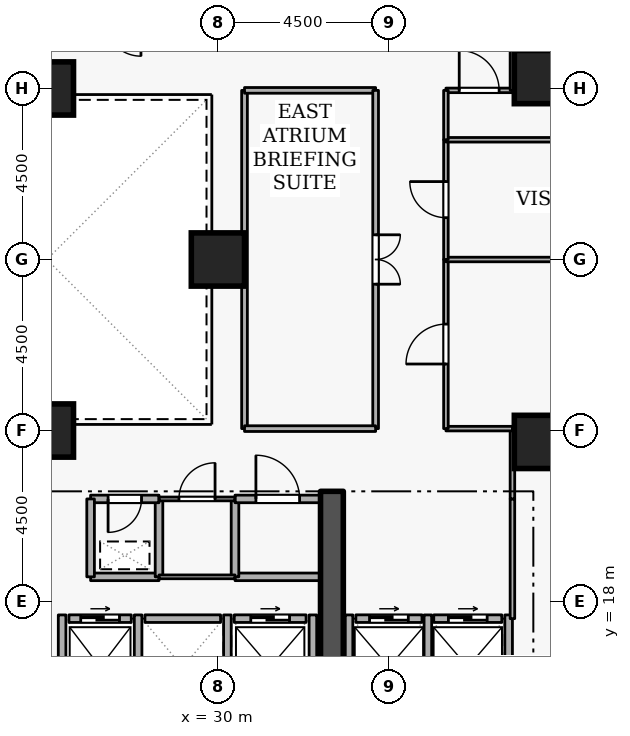
"""IFC4 building model, lengths in metres.
Left out: names, types, materials, properties, quantities, classifications, styles, units other than length and angle.
Written with IfcOpenShell. Run it as: python <this file> out.ifc"""

import sys

from ifc_helpers import new_model, si_unit, direction, frame, frame_2d, origin, origin_2d, place, context, subcontext, project, spatial, rectangle, extrude, element, fill, save


model = new_model("IFC4")
c1 = context("Model", 3, precision=1e-05, world=origin(), true_north=direction((0.0, 1.0)))
c2 = subcontext(c1, "Body", "Model", "MODEL_VIEW")
j1 = project(units=[si_unit("LENGTHUNIT", "METRE"), si_unit("PLANEANGLEUNIT", "RADIAN")], contexts=[c1])
p1 = place(None, origin())
s1 = spatial("IfcSite", under=j1, at=p1, CompositionType="ELEMENT")
p2 = place(p1, origin())
s2 = spatial("IfcBuilding", under=s1, at=p2, CompositionType="ELEMENT")
p3 = place(p2, frame((0.0, 0.0, 60.9)))
s3 = spatial("IfcBuildingStorey", under=s2, at=p3, CompositionType="ELEMENT", Elevation=60.9)
p4 = place(p3, frame((33.0, 15.2, 0.0), z_axis=(0.0, 0.0, 1.0), x_axis=(0.0, 1.0, 0.0)))
e1 = element("IfcWall", 1, at=p4, inside=s3, PredefinedType="SHEAR", context=c2, shape_type="SweptSolid", body=[
    extrude(rectangle(XDim=5.7, YDim=0.6, at=frame_2d((2.85, 0.0))), origin(), (0.0, 0.0, 1.0), 3.6),
])
for number, where, z_axis, x_axis in (
    (2, (38.5, 22.2, 0.0), (0.0, 0.0, 1.0), (1.0, 0.0, 0.0)),
    (3, (38.5, 31.8, 0.0), (0.0, 0.0, 1.0), (1.0, 0.0, 0.0)),
    (4, (25.5, 22.5, 0.0), (0.0, 0.0, 1.0), (1.0, 0.0, 0.0)),
    (5, (25.5, 31.5, 0.0), (0.0, 0.0, 1.0), (1.0, 0.0, 0.0)),
    (6, (30.0, 27.0, 0.0), (0.0, 0.0, 1.0), (1.0, 0.0, 0.0)),
):
    element("IfcColumn", number, at=place(p3, frame(where, z_axis=z_axis, x_axis=x_axis)), inside=s3, PredefinedType="COLUMN", context=c2, shape_type="SweptSolid", body=[
        extrude(rectangle(XDim=1.4, YDim=1.4, at=origin_2d()), origin(), (0.0, 0.0, 1.0), 3.6),
    ])
p5 = place(p3, frame((26.08, 17.55, 0.0), z_axis=(0.0, 0.0, 1.0), x_axis=(1.0, 0.0, 0.0)))
e7 = element("IfcWall", 7, at=p5, inside=s3, PredefinedType="STANDARD", context=c2, shape_type="SweptSolid", body=[
    extrude(rectangle(XDim=1.64, YDim=0.2, at=frame_2d((0.82, 0.0))), origin(), (0.0, 0.0, 1.0), 3.34),
])
p6 = place(p5, frame((0.31, 0.0, 0.0)))
e8 = element("IfcOpeningElement", 8, at=p6, cuts=e7, PredefinedType="OPENING", context=c2, shape_type="SweptSolid", body=[
    extrude(rectangle(XDim=1.02, YDim=2.06, at=frame_2d((0.51, 1.03))), frame((0.0, 0.11, 0.0), z_axis=(0.0, -1.0, 0.0), x_axis=(1.0, 0.0, 0.0)), (0.0, 0.0, 1.0), 0.22),
])
p7 = place(p3, frame((28.08, 17.55, 0.0), z_axis=(0.0, 0.0, 1.0), x_axis=(1.0, 0.0, 0.0)))
e9 = element("IfcWall", 9, at=p7, inside=s3, PredefinedType="STANDARD", context=c2, shape_type="SweptSolid", body=[
    extrude(rectangle(XDim=1.99, YDim=0.2, at=frame_2d((0.995, 0.0))), origin(), (0.0, 0.0, 1.0), 3.34),
])
p8 = place(p3, frame((30.43, 17.55, 0.0), z_axis=(0.0, 0.0, 1.0), x_axis=(1.0, 0.0, 0.0)))
e10 = element("IfcWall", 10, at=p8, inside=s3, PredefinedType="STANDARD", context=c2, shape_type="SweptSolid", body=[
    extrude(rectangle(XDim=1.89, YDim=0.2, at=frame_2d((0.945, 0.0))), origin(), (0.0, 0.0, 1.0), 3.34),
])
p9 = place(p8, frame((0.435, 0.0, 0.0)))
e11 = element("IfcOpeningElement", 11, at=p9, cuts=e10, PredefinedType="OPENING", context=c2, shape_type="SweptSolid", body=[
    extrude(rectangle(XDim=1.02, YDim=2.06, at=frame_2d((0.51, 1.03))), frame((0.0, 0.11, 0.0), z_axis=(0.0, -1.0, 0.0), x_axis=(1.0, 0.0, 0.0)), (0.0, 0.0, 1.0), 0.22),
])
p10 = place(p3, frame((33.63, 17.55, 0.0), z_axis=(0.0, 0.0, 1.0), x_axis=(1.0, 0.0, 0.0)))
e12 = element("IfcWall", 12, at=p10, inside=s3, PredefinedType="STANDARD", context=c2, shape_type="SweptSolid", body=[
    extrude(rectangle(XDim=1.74, YDim=0.2, at=frame_2d((0.87, 0.0))), origin(), (0.0, 0.0, 1.0), 3.34),
])
p11 = place(p10, frame((0.36, 0.0, 0.0)))
e13 = element("IfcOpeningElement", 13, at=p11, cuts=e12, PredefinedType="OPENING", context=c2, shape_type="SweptSolid", body=[
    extrude(rectangle(XDim=1.02, YDim=2.06, at=frame_2d((0.51, 1.03))), frame((0.0, 0.11, 0.0), z_axis=(0.0, -1.0, 0.0), x_axis=(1.0, 0.0, 0.0)), (0.0, 0.0, 1.0), 0.22),
])
p12 = place(p3, frame((35.68, 17.55, 0.0), z_axis=(0.0, 0.0, 1.0), x_axis=(1.0, 0.0, 0.0)))
e14 = element("IfcWall", 14, at=p12, inside=s3, PredefinedType="STANDARD", context=c2, shape_type="SweptSolid", body=[
    extrude(rectangle(XDim=1.79, YDim=0.2, at=frame_2d((0.895, 0.0))), origin(), (0.0, 0.0, 1.0), 3.34),
])
p13 = place(p12, frame((0.385, 0.0, 0.0)))
e15 = element("IfcOpeningElement", 15, at=p13, cuts=e14, PredefinedType="OPENING", context=c2, shape_type="SweptSolid", body=[
    extrude(rectangle(XDim=1.02, YDim=2.06, at=frame_2d((0.51, 1.03))), frame((0.0, 0.11, 0.0), z_axis=(0.0, -1.0, 0.0), x_axis=(1.0, 0.0, 0.0)), (0.0, 0.0, 1.0), 0.22),
])
for number, where, z_axis, x_axis in (
    (16, (27.9, 15.212, 0.0), (0.0, 0.0, 1.0), (0.0, 1.0, 0.0)),
    (17, (25.9, 15.212, 0.0), (0.0, 0.0, 1.0), (0.0, 1.0, 0.0)),
    (18, (30.25, 15.212, 0.0), (0.0, 0.0, 1.0), (0.0, 1.0, 0.0)),
    (19, (32.5, 15.212, 0.0), (0.0, 0.0, 1.0), (0.0, 1.0, 0.0)),
):
    element("IfcWall", number, at=place(p3, frame(where, z_axis=z_axis, x_axis=x_axis)), inside=s3, PredefinedType="STANDARD", context=c2, shape_type="SweptSolid", body=[
        extrude(rectangle(XDim=2.436, YDim=0.2, at=frame_2d((1.218, 0.0))), origin(), (0.0, 0.0, 1.0), 3.34),
    ])
for number, where, z_axis, x_axis in (
    (20, (35.525, 15.012, 0.0), (0.0, 0.0, 1.0), (0.0, 1.0, 0.0)),
    (21, (33.45, 15.012, 0.0), (0.0, 0.0, 1.0), (0.0, 1.0, 0.0)),
    (22, (37.65, 15.012, 0.0), (0.0, 0.0, 1.0), (0.0, 1.0, 0.0)),
):
    element("IfcWall", number, at=place(p3, frame(where, z_axis=z_axis, x_axis=x_axis)), inside=s3, PredefinedType="STANDARD", context=c2, shape_type="SweptSolid", body=[
        extrude(rectangle(XDim=2.636, YDim=0.2, at=frame_2d((1.318, 0.0))), origin(), (0.0, 0.0, 1.0), 3.34),
    ])
p14 = place(p3, frame((26.65, 18.65, 0.0), z_axis=(0.0, 0.0, 1.0), x_axis=(1.0, 0.0, 0.0)))
e23 = element("IfcWall", 23, at=p14, inside=s3, PredefinedType="STANDARD", context=c2, shape_type="SweptSolid", body=[
    extrude(rectangle(XDim=1.8, YDim=0.2, at=frame_2d((0.9, 0.0))), origin(), (0.0, 0.0, 1.0), 3.34),
])
p15 = place(p3, frame((28.45, 18.65, 0.0), z_axis=(0.0, 0.0, 1.0), x_axis=(0.0, 1.0, 0.0)))
e24 = element("IfcWall", 24, at=p15, inside=s3, PredefinedType="STANDARD", context=c2, shape_type="SweptSolid", body=[
    extrude(rectangle(XDim=2.05, YDim=0.2, at=frame_2d((1.025, 0.0))), origin(), (0.0, 0.0, 1.0), 3.34),
])
p16 = place(p3, frame((28.45, 20.7, 0.0), z_axis=(0.0, 0.0, 1.0), x_axis=(-1.0, 0.0, 0.0)))
e25 = element("IfcWall", 25, at=p16, inside=s3, PredefinedType="STANDARD", context=c2, shape_type="SweptSolid", body=[
    extrude(rectangle(XDim=1.8, YDim=0.2, at=frame_2d((0.9, 0.0))), origin(), (0.0, 0.0, 1.0), 3.34),
])
p17 = place(p16, frame((0.46, 0.0, 0.0)))
e26 = element("IfcOpeningElement", 26, at=p17, cuts=e25, PredefinedType="OPENING", context=c2, shape_type="SweptSolid", body=[
    extrude(rectangle(XDim=0.88, YDim=2.04, at=frame_2d((0.44, 1.02))), frame((0.0, 0.11, 0.0), z_axis=(0.0, -1.0, 0.0), x_axis=(1.0, 0.0, 0.0)), (0.0, 0.0, 1.0), 0.22),
])
p18 = place(p3, frame((26.65, 20.7, 0.0), z_axis=(0.0, 0.0, 1.0), x_axis=(0.0, -1.0, 0.0)))
e27 = element("IfcWall", 27, at=p18, inside=s3, PredefinedType="STANDARD", context=c2, shape_type="SweptSolid", body=[
    extrude(rectangle(XDim=2.05, YDim=0.2, at=frame_2d((1.025, 0.0))), origin(), (0.0, 0.0, 1.0), 3.34),
])
p19 = place(p3, frame((32.7, 18.65, 0.0), z_axis=(0.0, 0.0, 1.0), x_axis=(-1.0, 0.0, 0.0)))
e28 = element("IfcWall", 28, at=p19, inside=s3, PredefinedType="STANDARD", context=c2, shape_type="SweptSolid", body=[
    extrude(rectangle(XDim=2.25, YDim=0.2, at=frame_2d((1.125, 0.0))), origin(), (0.0, 0.0, 1.0), 3.34),
])
p20 = place(p3, frame((30.45, 18.65, 0.0), z_axis=(0.0, 0.0, 1.0), x_axis=(0.0, 1.0, 0.0)))
e29 = element("IfcWall", 29, at=p20, inside=s3, PredefinedType="STANDARD", context=c2, shape_type="SweptSolid", body=[
    extrude(rectangle(XDim=2.05, YDim=0.2, at=frame_2d((1.025, 0.0))), origin(), (0.0, 0.0, 1.0), 3.34),
])
p21 = place(p3, frame((30.45, 20.7, 0.0), z_axis=(0.0, 0.0, 1.0), x_axis=(1.0, 0.0, 0.0)))
e30 = element("IfcWall", 30, at=p21, inside=s3, PredefinedType="STANDARD", context=c2, shape_type="SweptSolid", body=[
    extrude(rectangle(XDim=2.25, YDim=0.2, at=frame_2d((1.125, 0.0))), origin(), (0.0, 0.0, 1.0), 3.34),
])
p22 = place(p21, frame((0.55, 0.0, 0.0)))
e31 = element("IfcOpeningElement", 31, at=p22, cuts=e30, PredefinedType="OPENING", context=c2, shape_type="SweptSolid", body=[
    extrude(rectangle(XDim=1.15, YDim=2.1, at=frame_2d((0.575, 1.05))), frame((0.0, 0.11, 0.0), z_axis=(0.0, -1.0, 0.0), x_axis=(1.0, 0.0, 0.0)), (0.0, 0.0, 1.0), 0.22),
])
p23 = place(p3, frame((30.45, 18.65, 0.0), z_axis=(0.0, 0.0, 1.0), x_axis=(-1.0, 0.0, 0.0)))
e32 = element("IfcWall", 32, at=p23, inside=s3, PredefinedType="PARTITIONING", context=c2, shape_type="SweptSolid", body=[
    extrude(rectangle(XDim=2.0, YDim=0.1, at=frame_2d((1.0, 0.0))), origin(), (0.0, 0.0, 1.0), 3.34),
])
p24 = place(p3, frame((28.45, 20.7, 0.0), z_axis=(0.0, 0.0, 1.0), x_axis=(1.0, 0.0, 0.0)))
e33 = element("IfcWall", 33, at=p24, inside=s3, PredefinedType="PARTITIONING", context=c2, shape_type="SweptSolid", body=[
    extrude(rectangle(XDim=2.0, YDim=0.1, at=frame_2d((1.0, 0.0))), origin(), (0.0, 0.0, 1.0), 3.34),
])
p25 = place(p24, frame((0.525, 0.0, 0.0)))
e34 = element("IfcOpeningElement", 34, at=p25, cuts=e33, PredefinedType="OPENING", context=c2, shape_type="SweptSolid", body=[
    extrude(rectangle(XDim=0.95, YDim=2.1, at=frame_2d((0.475, 1.05))), frame((0.0, 0.06, 0.0), z_axis=(0.0, -1.0, 0.0), x_axis=(1.0, 0.0, 0.0)), (0.0, 0.0, 1.0), 0.12),
])
p26 = place(p3, frame((37.75, 17.55, 0.0), z_axis=(0.0, 0.0, 1.0), x_axis=(0.0, 1.0, 0.0)))
e35 = element("IfcWall", 35, at=p26, inside=s3, PredefinedType="PARTITIONING", context=c2, shape_type="SweptSolid", body=[
    extrude(rectangle(XDim=3.15, YDim=0.12, at=frame_2d((1.575, 0.0))), origin(), (0.0, 0.0, 1.0), 3.34),
])
p27 = place(p3, frame((37.75, 20.7, 0.0), z_axis=(0.0, 0.0, 1.0), x_axis=(0.0, 1.0, 0.0)))
e36 = element("IfcWall", 36, at=p27, inside=s3, PredefinedType="PARTITIONING", context=c2, shape_type="SweptSolid", body=[
    extrude(rectangle(XDim=1.85, YDim=0.12, at=frame_2d((0.925, 0.0))), origin(), (0.0, 0.0, 1.0), 3.34),
])
p28 = place(p3, frame((37.75, 22.55, 0.0), z_axis=(0.0, 0.0, 1.0), x_axis=(-1.0, 0.0, 0.0)))
e37 = element("IfcWall", 37, at=p28, inside=s3, PredefinedType="PARTITIONING", context=c2, shape_type="SweptSolid", body=[
    extrude(rectangle(XDim=1.75, YDim=0.12, at=frame_2d((0.875, 0.0))), origin(), (0.0, 0.0, 1.0), 3.34),
])
p29 = place(p3, frame((36.0, 22.55, 0.0), z_axis=(0.0, 0.0, 1.0), x_axis=(0.0, 1.0, 0.0)))
e38 = element("IfcWall", 38, at=p29, inside=s3, PredefinedType="PARTITIONING", context=c2, shape_type="SweptSolid", body=[
    extrude(rectangle(XDim=4.45, YDim=0.12, at=frame_2d((2.225, 0.0))), origin(), (0.0, 0.0, 1.0), 3.34),
])
p30 = place(p29, frame((1.7, 0.0, 0.0)))
e39 = element("IfcOpeningElement", 39, at=p30, cuts=e38, PredefinedType="OPENING", context=c2, shape_type="SweptSolid", body=[
    extrude(rectangle(XDim=1.05, YDim=2.1, at=frame_2d((0.525, 1.05))), frame((0.0, 0.07, 0.0), z_axis=(0.0, -1.0, 0.0), x_axis=(1.0, 0.0, 0.0)), (0.0, 0.0, 1.0), 0.14),
])
p31 = place(p3, frame((36.0, 27.0, 0.0), z_axis=(0.0, 0.0, 1.0), x_axis=(1.0, 0.0, 0.0)))
e40 = element("IfcWall", 40, at=p31, inside=s3, PredefinedType="PARTITIONING", context=c2, shape_type="SweptSolid", body=[
    extrude(rectangle(XDim=13.72, YDim=0.12, at=frame_2d((6.86, 0.0))), origin(), (0.0, 0.0, 1.0), 2.878),
])
p32 = place(p3, frame((36.0, 27.0, 0.0), z_axis=(0.0, 0.0, 1.0), x_axis=(0.0, 1.0, 0.0)))
e41 = element("IfcWall", 41, at=p32, inside=s3, PredefinedType="PARTITIONING", context=c2, shape_type="SweptSolid", body=[
    extrude(rectangle(XDim=3.15, YDim=0.12, at=frame_2d((1.575, 0.0))), origin(), (0.0, 0.0, 1.0), 3.34),
])
p33 = place(p32, frame((1.1, 0.0, 0.0)))
e42 = element("IfcOpeningElement", 42, at=p33, cuts=e41, PredefinedType="OPENING", context=c2, shape_type="SweptSolid", body=[
    extrude(rectangle(XDim=0.95, YDim=2.1, at=frame_2d((0.475, 1.05))), frame((0.0, 0.07, 0.0), z_axis=(0.0, -1.0, 0.0), x_axis=(1.0, 0.0, 0.0)), (0.0, 0.0, 1.0), 0.14),
])
p34 = place(p3, frame((36.0, 30.15, 0.0), z_axis=(0.0, 0.0, 1.0), x_axis=(1.0, 0.0, 0.0)))
e43 = element("IfcWall", 43, at=p34, inside=s3, PredefinedType="PARTITIONING", context=c2, shape_type="SweptSolid", body=[
    extrude(rectangle(XDim=13.72, YDim=0.12, at=frame_2d((6.86, 0.0))), origin(), (0.0, 0.0, 1.0), 3.34),
])
p35 = place(p3, frame((36.0, 31.45, 0.0), z_axis=(0.0, 0.0, 1.0), x_axis=(1.0, 0.0, 0.0)))
e44 = element("IfcWall", 44, at=p35, inside=s3, PredefinedType="PARTITIONING", context=c2, shape_type="SweptSolid", body=[
    extrude(rectangle(XDim=1.75, YDim=0.12, at=frame_2d((0.875, 0.0))), origin(), (0.0, 0.0, 1.0), 3.34),
])
p36 = place(p35, frame((0.35, 0.0, 0.0)))
e45 = element("IfcOpeningElement", 45, at=p36, cuts=e44, PredefinedType="OPENING", context=c2, shape_type="SweptSolid", body=[
    extrude(rectangle(XDim=1.05, YDim=2.1, at=frame_2d((0.525, 1.05))), frame((0.0, 0.07, 0.0), z_axis=(0.0, -1.0, 0.0), x_axis=(1.0, 0.0, 0.0)), (0.0, 0.0, 1.0), 0.14),
])
p37 = place(p3, frame((37.75, 31.45, 0.0), z_axis=(0.0, 0.0, 1.0), x_axis=(0.0, 1.0, 0.0)))
e46 = element("IfcWall", 46, at=p37, inside=s3, PredefinedType="PARTITIONING", context=c2, shape_type="SweptSolid", body=[
    extrude(rectangle(XDim=1.85, YDim=0.12, at=frame_2d((0.925, 0.0))), origin(), (0.0, 0.0, 1.0), 3.34),
])
p38 = place(p3, frame((36.0, 30.15, 0.0), z_axis=(0.0, 0.0, 1.0), x_axis=(0.0, 1.0, 0.0)))
e47 = element("IfcWall", 47, at=p38, inside=s3, PredefinedType="PARTITIONING", context=c2, shape_type="SweptSolid", body=[
    extrude(rectangle(XDim=1.3, YDim=0.12, at=frame_2d((0.65, 0.0))), origin(), (0.0, 0.0, 1.0), 3.34),
])
p39 = place(p3, frame((30.7, 22.55, 0.0), z_axis=(0.0, 0.0, 1.0), x_axis=(0.0, 1.0, 0.0)))
e48 = element("IfcWall", 48, at=p39, inside=s3, PredefinedType="PARTITIONING", context=c2, shape_type="SweptSolid", body=[
    extrude(rectangle(XDim=8.9, YDim=0.15, at=frame_2d((4.45, 0.0))), origin(), (0.0, 0.0, 1.0), 3.34),
])
p40 = place(p3, frame((30.7, 31.45, 0.0), z_axis=(0.0, 0.0, 1.0), x_axis=(1.0, 0.0, 0.0)))
e49 = element("IfcWall", 49, at=p40, inside=s3, PredefinedType="PARTITIONING", context=c2, shape_type="SweptSolid", body=[
    extrude(rectangle(XDim=3.45, YDim=0.15, at=frame_2d((1.725, 0.0))), origin(), (0.0, 0.0, 1.0), 3.34),
])
p41 = place(p3, frame((34.15, 31.45, 0.0), z_axis=(0.0, 0.0, 1.0), x_axis=(0.0, -1.0, 0.0)))
e50 = element("IfcWall", 50, at=p41, inside=s3, PredefinedType="PARTITIONING", context=c2, shape_type="SweptSolid", body=[
    extrude(rectangle(XDim=8.9, YDim=0.15, at=frame_2d((4.45, 0.0))), origin(), (0.0, 0.0, 1.0), 3.34),
])
p42 = place(p41, frame((3.8, 0.0, 0.0)))
e51 = element("IfcOpeningElement", 51, at=p42, cuts=e50, PredefinedType="OPENING", context=c2, shape_type="SweptSolid", body=[
    extrude(rectangle(XDim=1.3, YDim=2.12, at=frame_2d((0.65, 1.06))), frame((0.0, 0.085, 0.0), z_axis=(0.0, -1.0, 0.0), x_axis=(1.0, 0.0, 0.0)), (0.0, 0.0, 1.0), 0.17),
])
p43 = place(p3, frame((34.15, 22.55, 0.0), z_axis=(0.0, 0.0, 1.0), x_axis=(-1.0, 0.0, 0.0)))
e52 = element("IfcWall", 52, at=p43, inside=s3, PredefinedType="PARTITIONING", context=c2, shape_type="SweptSolid", body=[
    extrude(rectangle(XDim=3.45, YDim=0.15, at=frame_2d((1.725, 0.0))), origin(), (0.0, 0.0, 1.0), 3.34),
])
p44 = place(p6, origin())
e53 = element("IfcDoor", 53, at=p44, inside=s3, OperationType="SLIDING_TO_LEFT", PredefinedType="DOOR", context=c2, shape_type="SweptSolid", body=[
    extrude(rectangle(XDim=1.02, YDim=2.06, at=frame_2d((0.51, 1.03))), frame((0.0, 0.025, 0.0), z_axis=(0.0, -1.0, 0.0), x_axis=(1.0, 0.0, 0.0)), (0.0, 0.0, 1.0), 0.05),
])
fill(e8, e53)
p45 = place(p9, origin())
e54 = element("IfcDoor", 54, at=p45, inside=s3, OperationType="SLIDING_TO_LEFT", PredefinedType="DOOR", context=c2, shape_type="SweptSolid", body=[
    extrude(rectangle(XDim=1.02, YDim=2.06, at=frame_2d((0.51, 1.03))), frame((0.0, 0.025, 0.0), z_axis=(0.0, -1.0, 0.0), x_axis=(1.0, 0.0, 0.0)), (0.0, 0.0, 1.0), 0.05),
])
fill(e11, e54)
p46 = place(p11, origin())
e55 = element("IfcDoor", 55, at=p46, inside=s3, OperationType="SLIDING_TO_LEFT", PredefinedType="DOOR", context=c2, shape_type="SweptSolid", body=[
    extrude(rectangle(XDim=1.02, YDim=2.06, at=frame_2d((0.51, 1.03))), frame((0.0, 0.025, 0.0), z_axis=(0.0, -1.0, 0.0), x_axis=(1.0, 0.0, 0.0)), (0.0, 0.0, 1.0), 0.05),
])
fill(e13, e55)
p47 = place(p13, origin())
e56 = element("IfcDoor", 56, at=p47, inside=s3, OperationType="SLIDING_TO_LEFT", PredefinedType="DOOR", context=c2, shape_type="SweptSolid", body=[
    extrude(rectangle(XDim=1.02, YDim=2.06, at=frame_2d((0.51, 1.03))), frame((0.0, 0.025, 0.0), z_axis=(0.0, -1.0, 0.0), x_axis=(1.0, 0.0, 0.0)), (0.0, 0.0, 1.0), 0.05),
])
fill(e15, e56)
p48 = place(p17, origin())
e57 = element("IfcDoor", 57, at=p48, inside=s3, OperationType="SINGLE_SWING_RIGHT", PredefinedType="DOOR", context=c2, shape_type="SweptSolid", body=[
    extrude(rectangle(XDim=0.88, YDim=2.04, at=frame_2d((0.44, 1.02))), frame((0.0, 0.025, 0.0), z_axis=(0.0, -1.0, 0.0), x_axis=(1.0, 0.0, 0.0)), (0.0, 0.0, 1.0), 0.05),
])
fill(e26, e57)
p49 = place(p25, origin())
e58 = element("IfcDoor", 58, at=p49, inside=s3, OperationType="SINGLE_SWING_RIGHT", PredefinedType="DOOR", context=c2, shape_type="SweptSolid", body=[
    extrude(rectangle(XDim=0.95, YDim=2.1, at=frame_2d((0.475, 1.05))), frame((0.0, 0.025, 0.0), z_axis=(0.0, -1.0, 0.0), x_axis=(1.0, 0.0, 0.0)), (0.0, 0.0, 1.0), 0.05),
])
fill(e34, e58)
p50 = place(p22, origin())
e59 = element("IfcDoor", 59, at=p50, inside=s3, OperationType="SINGLE_SWING_LEFT", PredefinedType="DOOR", context=c2, shape_type="SweptSolid", body=[
    extrude(rectangle(XDim=1.15, YDim=2.1, at=frame_2d((0.575, 1.05))), frame((0.0, 0.025, 0.0), z_axis=(0.0, -1.0, 0.0), x_axis=(1.0, 0.0, 0.0)), (0.0, 0.0, 1.0), 0.05),
])
fill(e31, e59)
p51 = place(p30, origin())
e60 = element("IfcDoor", 60, at=p51, inside=s3, OperationType="SINGLE_SWING_LEFT", PredefinedType="DOOR", context=c2, shape_type="SweptSolid", body=[
    extrude(rectangle(XDim=1.05, YDim=2.1, at=frame_2d((0.525, 1.05))), frame((0.0, 0.025, 0.0), z_axis=(0.0, -1.0, 0.0), x_axis=(1.0, 0.0, 0.0)), (0.0, 0.0, 1.0), 0.05),
])
fill(e39, e60)
p52 = place(p33, origin())
e61 = element("IfcDoor", 61, at=p52, inside=s3, OperationType="SINGLE_SWING_RIGHT", PredefinedType="DOOR", context=c2, shape_type="SweptSolid", body=[
    extrude(rectangle(XDim=0.95, YDim=2.1, at=frame_2d((0.475, 1.05))), frame((0.0, 0.025, 0.0), z_axis=(0.0, -1.0, 0.0), x_axis=(1.0, 0.0, 0.0)), (0.0, 0.0, 1.0), 0.05),
])
fill(e42, e61)
p53 = place(p36, origin())
e62 = element("IfcDoor", 62, at=p53, inside=s3, OperationType="SINGLE_SWING_LEFT", PredefinedType="DOOR", context=c2, shape_type="SweptSolid", body=[
    extrude(rectangle(XDim=1.05, YDim=2.1, at=frame_2d((0.525, 1.05))), frame((0.0, 0.025, 0.0), z_axis=(0.0, -1.0, 0.0), x_axis=(1.0, 0.0, 0.0)), (0.0, 0.0, 1.0), 0.05),
])
fill(e45, e62)
p54 = place(p42, origin())
e63 = element("IfcDoor", 63, at=p54, inside=s3, OperationType="DOUBLE_DOOR_SINGLE_SWING", PredefinedType="DOOR", context=c2, shape_type="SweptSolid", body=[
    extrude(rectangle(XDim=1.3, YDim=2.12, at=frame_2d((0.65, 1.06))), frame((0.0, 0.025, 0.0), z_axis=(0.0, -1.0, 0.0), x_axis=(1.0, 0.0, 0.0)), (0.0, 0.0, 1.0), 0.05),
])
fill(e51, e63)
save(model, sys.argv[1])
